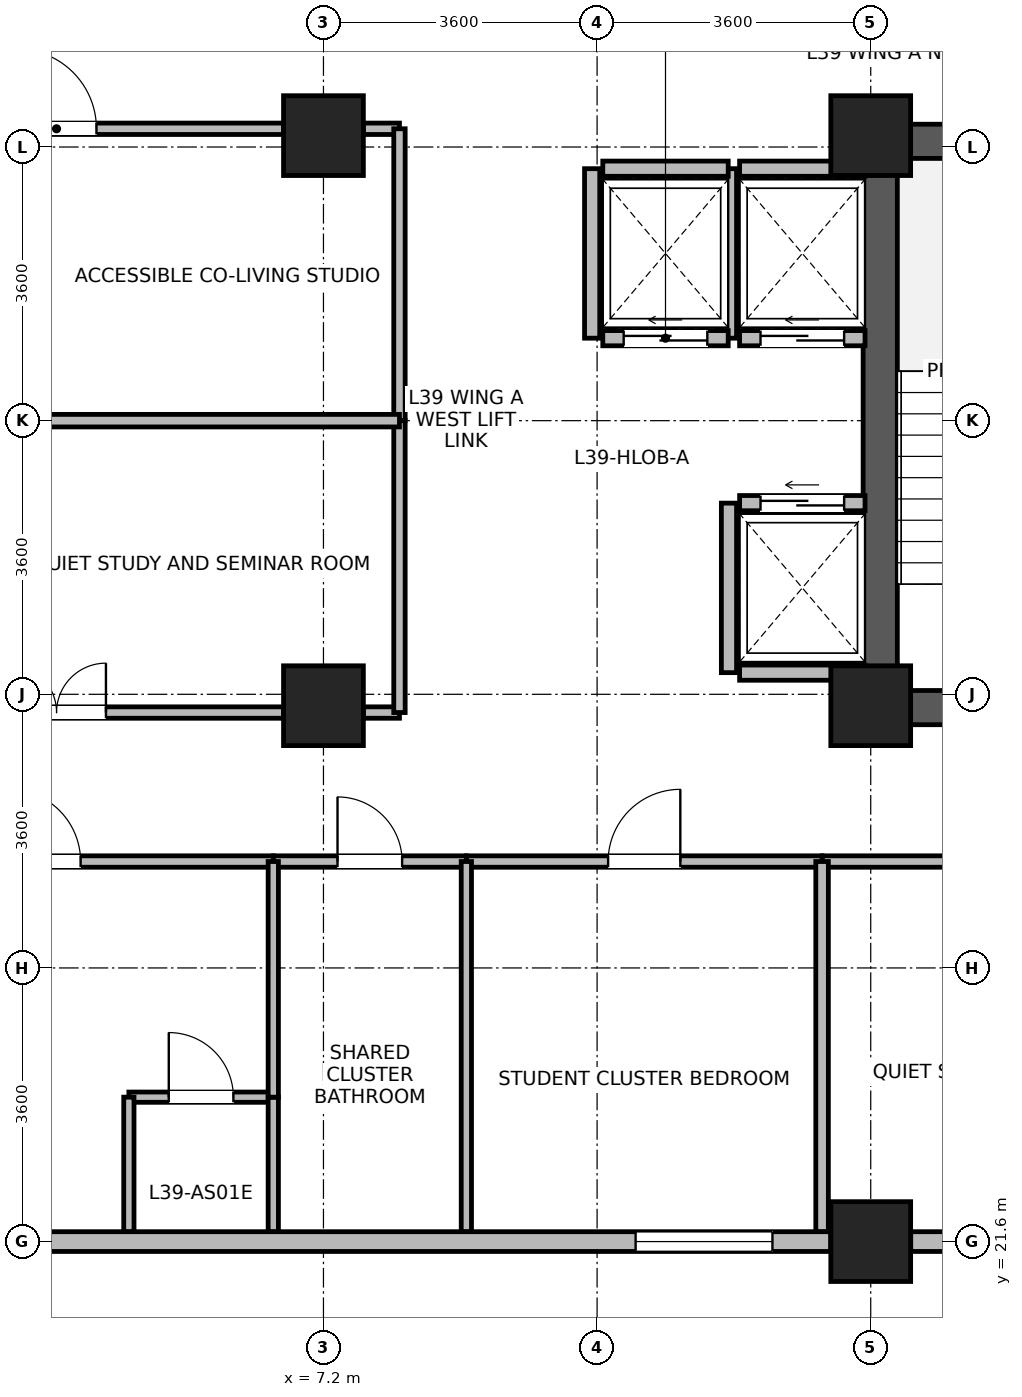
"""IFC4 building model, lengths in metres.
Left out: names, types, materials, properties, quantities, classifications, styles, units other than length and angle.
Written with IfcOpenShell. Run it as: python <this file> out.ifc"""

import sys

from ifc_helpers import new_model, si_unit, direction, frame, frame_2d, origin, origin_2d, place, context, subcontext, project, spatial, rectangle, extrude, source, transform, mapped, element, fill, save


model = new_model("IFC4")
c1 = context("Model", 3, precision=1e-05, world=origin(), true_north=direction((0.0, 1.0)))
c2 = subcontext(c1, "Body", "Model", "MODEL_VIEW")
j1 = project(units=[si_unit("LENGTHUNIT", "METRE"), si_unit("PLANEANGLEUNIT", "RADIAN")], contexts=[c1])
p1 = place(None, origin())
s1 = spatial("IfcSite", under=j1, at=p1, CompositionType="ELEMENT")
p2 = place(p1, origin())
s2 = spatial("IfcBuilding", under=s1, at=p2, CompositionType="ELEMENT")
p3 = place(p2, frame((0.0, 0.0, 155.0)))
s3 = spatial("IfcBuildingStorey", under=s2, at=p3, CompositionType="ELEMENT", Elevation=155.0)
p4 = place(p3, frame((14.525, 28.4, 0.0), z_axis=(0.0, 0.0, 1.0), x_axis=(0.0, 1.0, 0.0)))
e1 = element("IfcWall", 1, at=p4, inside=s3, PredefinedType="SHEAR", context=c2, shape_type="SweptSolid", body=[
    extrude(rectangle(XDim=7.9, YDim=0.45, at=frame_2d((3.95, 0.0))), origin(), (0.0, 0.0, 1.0), 3.46),
])
for number, where, z_axis, x_axis in (
    (2, (14.75, 28.625, 0.0), (0.0, 0.0, 1.0), (1.0, 0.0, 0.0)),
    (3, (14.75, 36.075, 0.0), (0.0, 0.0, 1.0), (1.0, 0.0, 0.0)),
):
    element("IfcWall", number, at=place(p3, frame(where, z_axis=z_axis, x_axis=x_axis)), inside=s3, PredefinedType="SHEAR", context=c2, shape_type="SweptSolid", body=[
        extrude(rectangle(XDim=3.2, YDim=0.45, at=frame_2d((1.6, 0.0))), origin(), (0.0, 0.0, 1.0), 3.46),
    ])
m1 = source(origin(), c2, "Body", "SweptSolid", [
    extrude(rectangle(XDim=1.05, YDim=1.05, at=origin_2d()), origin(), (0.0, 0.0, 1.0), 3.7),
])
for number, where, z_axis, x_axis in (
    (4, (7.2, 28.65, 0.0), (0.0, 0.0, 1.0), (1.0, 0.0, 0.0)),
    (5, (7.2, 36.15, 0.0), (0.0, 0.0, 1.0), (1.0, 0.0, 0.0)),
    (6, (14.4, 21.6, 0.0), (0.0, 0.0, 1.0), (1.0, 0.0, 0.0)),
    (7, (14.4, 28.65, 0.0), (0.0, 0.0, 1.0), (1.0, 0.0, 0.0)),
    (8, (14.4, 36.15, 0.0), (0.0, 0.0, 1.0), (1.0, 0.0, 0.0)),
):
    element("IfcColumn", number, at=place(p3, frame(where, z_axis=z_axis, x_axis=x_axis)), inside=s3, PredefinedType="COLUMN", context=c2, shape_type="MappedRepresentation", body=[
        mapped(m1, transform((0.0, 0.0, 0.0), x_axis=(1.0, 0.0, 0.0), y_axis=(0.0, 1.0, 0.0), z_axis=(0.0, 0.0, 1.0), scale=1.0)),
    ])
p5 = place(p3, frame((13.874, 21.6, 0.0), z_axis=(0.0, 0.0, 1.0), x_axis=(-1.0, 0.0, 0.0)))
e9 = element("IfcWall", 9, at=p5, inside=s3, PredefinedType="STANDARD", context=c2, shape_type="SweptSolid", body=[
    extrude(rectangle(XDim=13.337, YDim=0.26, at=frame_2d((6.668, 0.0))), origin(), (0.0, 0.0, 1.0), 3.44),
])
p6 = place(p5, frame((0.767, 0.0, 0.85)))
e10 = element("IfcOpeningElement", 10, at=p6, cuts=e9, PredefinedType="OPENING", context=c2, shape_type="SweptSolid", body=[
    extrude(rectangle(XDim=1.8, YDim=1.85, at=frame_2d((0.9, 0.925))), frame((0.0, 0.14, 0.0), z_axis=(0.0, -1.0, 0.0), x_axis=(1.0, 0.0, 0.0)), (0.0, 0.0, 1.0), 0.28),
])
p7 = place(p5, frame((10.77, 0.0, 0.85)))
e11 = element("IfcOpeningElement", 11, at=p7, cuts=e9, PredefinedType="OPENING", context=c2, shape_type="SweptSolid", body=[
    extrude(rectangle(XDim=1.8, YDim=1.85, at=frame_2d((0.9, 0.925))), frame((0.0, 0.14, 0.0), z_axis=(0.0, -1.0, 0.0), x_axis=(1.0, 0.0, 0.0)), (0.0, 0.0, 1.0), 0.28),
])
p8 = place(p3, frame((17.797, 21.6, 0.0), z_axis=(0.0, 0.0, 1.0), x_axis=(-1.0, 0.0, 0.0)))
e12 = element("IfcWall", 12, at=p8, inside=s3, PredefinedType="STANDARD", context=c2, shape_type="SweptSolid", body=[
    extrude(rectangle(XDim=2.871, YDim=0.26, at=frame_2d((1.436, 0.0))), origin(), (0.0, 0.0, 1.0), 2.99),
])
p9 = place(p8, frame((0.96, 0.0, 0.85)))
e13 = element("IfcOpeningElement", 13, at=p9, cuts=e12, PredefinedType="OPENING", context=c2, shape_type="SweptSolid", body=[
    extrude(rectangle(XDim=0.95, YDim=1.75, at=frame_2d((0.475, 0.875))), frame((0.0, 0.14, 0.0), z_axis=(0.0, -1.0, 0.0), x_axis=(1.0, 0.0, 0.0)), (0.0, 0.0, 1.0), 0.28),
])
p10 = place(p3, frame((12.675, 33.485, 0.0), z_axis=(0.0, 0.0, 1.0), x_axis=(1.0, 0.0, 0.0)))
e14 = element("IfcWall", 14, at=p10, inside=s3, PredefinedType="PARTITIONING", context=c2, shape_type="SweptSolid", body=[
    extrude(rectangle(XDim=1.65, YDim=0.2, at=frame_2d((0.825, 0.0))), origin(), (0.0, 0.0, 1.0), 3.44),
])
p11 = place(p10, frame((0.275, 0.0, 0.0)))
e15 = element("IfcOpeningElement", 15, at=p11, cuts=e14, PredefinedType="OPENING", context=c2, shape_type="SweptSolid", body=[
    extrude(rectangle(XDim=1.1, YDim=2.12, at=frame_2d((0.55, 1.06))), frame((0.0, 0.11, 0.0), z_axis=(0.0, -1.0, 0.0), x_axis=(1.0, 0.0, 0.0)), (0.0, 0.0, 1.0), 0.22),
])
p12 = place(p3, frame((12.675, 35.715, 0.0), z_axis=(0.0, 0.0, 1.0), x_axis=(1.0, 0.0, 0.0)))
e16 = element("IfcWall", 16, at=p12, inside=s3, PredefinedType="PARTITIONING", context=c2, shape_type="SweptSolid", body=[
    extrude(rectangle(XDim=1.65, YDim=0.2, at=frame_2d((0.825, 0.0))), origin(), (0.0, 0.0, 1.0), 3.44),
])
p13 = place(p3, frame((12.535, 33.485, 0.0), z_axis=(0.0, 0.0, 1.0), x_axis=(0.0, 1.0, 0.0)))
e17 = element("IfcWall", 17, at=p13, inside=s3, PredefinedType="PARTITIONING", context=c2, shape_type="SweptSolid", body=[
    extrude(rectangle(XDim=2.23, YDim=0.2, at=frame_2d((1.115, 0.0))), origin(), (0.0, 0.0, 1.0), 3.44),
])
p14 = place(p3, frame((12.675, 29.085, 0.0), z_axis=(0.0, 0.0, 1.0), x_axis=(1.0, 0.0, 0.0)))
e18 = element("IfcWall", 18, at=p14, inside=s3, PredefinedType="PARTITIONING", context=c2, shape_type="SweptSolid", body=[
    extrude(rectangle(XDim=1.65, YDim=0.2, at=frame_2d((0.825, 0.0))), origin(), (0.0, 0.0, 1.0), 3.44),
])
p15 = place(p3, frame((12.675, 31.315, 0.0), z_axis=(0.0, 0.0, 1.0), x_axis=(1.0, 0.0, 0.0)))
e19 = element("IfcWall", 19, at=p15, inside=s3, PredefinedType="PARTITIONING", context=c2, shape_type="SweptSolid", body=[
    extrude(rectangle(XDim=1.65, YDim=0.2, at=frame_2d((0.825, 0.0))), origin(), (0.0, 0.0, 1.0), 3.44),
])
p16 = place(p15, frame((0.275, 0.0, 0.0)))
e20 = element("IfcOpeningElement", 20, at=p16, cuts=e19, PredefinedType="OPENING", context=c2, shape_type="SweptSolid", body=[
    extrude(rectangle(XDim=1.1, YDim=2.12, at=frame_2d((0.55, 1.06))), frame((0.0, 0.11, 0.0), z_axis=(0.0, -1.0, 0.0), x_axis=(1.0, 0.0, 0.0)), (0.0, 0.0, 1.0), 0.22),
])
p17 = place(p3, frame((12.535, 29.085, 0.0), z_axis=(0.0, 0.0, 1.0), x_axis=(0.0, 1.0, 0.0)))
e21 = element("IfcWall", 21, at=p17, inside=s3, PredefinedType="PARTITIONING", context=c2, shape_type="SweptSolid", body=[
    extrude(rectangle(XDim=2.23, YDim=0.2, at=frame_2d((1.115, 0.0))), origin(), (0.0, 0.0, 1.0), 3.44),
])
p18 = place(p3, frame((10.875, 33.485, 0.0), z_axis=(0.0, 0.0, 1.0), x_axis=(1.0, 0.0, 0.0)))
e22 = element("IfcWall", 22, at=p18, inside=s3, PredefinedType="PARTITIONING", context=c2, shape_type="SweptSolid", body=[
    extrude(rectangle(XDim=1.65, YDim=0.2, at=frame_2d((0.825, 0.0))), origin(), (0.0, 0.0, 1.0), 3.44),
])
p19 = place(p18, frame((0.275, 0.0, 0.0)))
e23 = element("IfcOpeningElement", 23, at=p19, cuts=e22, PredefinedType="OPENING", context=c2, shape_type="SweptSolid", body=[
    extrude(rectangle(XDim=1.1, YDim=2.12, at=frame_2d((0.55, 1.06))), frame((0.0, 0.11, 0.0), z_axis=(0.0, -1.0, 0.0), x_axis=(1.0, 0.0, 0.0)), (0.0, 0.0, 1.0), 0.22),
])
p20 = place(p3, frame((10.875, 35.715, 0.0), z_axis=(0.0, 0.0, 1.0), x_axis=(1.0, 0.0, 0.0)))
e24 = element("IfcWall", 24, at=p20, inside=s3, PredefinedType="PARTITIONING", context=c2, shape_type="SweptSolid", body=[
    extrude(rectangle(XDim=1.65, YDim=0.2, at=frame_2d((0.825, 0.0))), origin(), (0.0, 0.0, 1.0), 3.44),
])
p21 = place(p3, frame((10.735, 33.485, 0.0), z_axis=(0.0, 0.0, 1.0), x_axis=(0.0, 1.0, 0.0)))
e25 = element("IfcWall", 25, at=p21, inside=s3, PredefinedType="PARTITIONING", context=c2, shape_type="SweptSolid", body=[
    extrude(rectangle(XDim=2.23, YDim=0.2, at=frame_2d((1.115, 0.0))), origin(), (0.0, 0.0, 1.0), 3.44),
])
p22 = place(p3, frame((4.64, 23.5, 0.0), z_axis=(0.0, 0.0, 1.0), x_axis=(1.0, 0.0, 0.0)))
e26 = element("IfcWall", 26, at=p22, inside=s3, PredefinedType="PARTITIONING", context=c2, shape_type="SweptSolid", body=[
    extrude(rectangle(XDim=1.9, YDim=0.135, at=frame_2d((0.95, 0.0))), origin(), (0.0, 0.0, 1.0), 3.44),
])
p23 = place(p22, frame((0.525, 0.0, 0.0)))
e27 = element("IfcOpeningElement", 27, at=p23, cuts=e26, PredefinedType="OPENING", context=c2, shape_type="SweptSolid", body=[
    extrude(rectangle(XDim=0.85, YDim=2.04, at=frame_2d((0.425, 1.02))), frame((0.0, 0.078, 0.0), z_axis=(0.0, -1.0, 0.0), x_axis=(1.0, 0.0, 0.0)), (0.0, 0.0, 1.0), 0.155),
])
for number, where, z_axis, x_axis in (
    (28, (4.64, 21.732, 0.0), (0.0, 0.0, 1.0), (0.0, 1.0, 0.0)),
    (29, (6.54, 21.732, 0.0), (0.0, 0.0, 1.0), (0.0, 1.0, 0.0)),
):
    element("IfcWall", number, at=place(p3, frame(where, z_axis=z_axis, x_axis=x_axis)), inside=s3, PredefinedType="PARTITIONING", context=c2, shape_type="SweptSolid", body=[
        extrude(rectangle(XDim=1.768, YDim=0.135, at=frame_2d((0.884, 0.0))), origin(), (0.0, 0.0, 1.0), 3.44),
    ])
p24 = place(p3, frame((0.702, 28.56, 0.0), z_axis=(0.0, 0.0, 1.0), x_axis=(1.0, 0.0, 0.0)))
e30 = element("IfcWall", 30, at=p24, inside=s3, PredefinedType="PARTITIONING", context=c2, shape_type="SweptSolid", body=[
    extrude(rectangle(XDim=5.973, YDim=0.15, at=frame_2d((2.987, 0.0))), origin(), (0.0, 0.0, 1.0), 2.84),
])
p25 = place(p24, frame((2.336, 0.0, 0.0)))
e31 = element("IfcOpeningElement", 31, at=p25, cuts=e30, PredefinedType="OPENING", context=c2, shape_type="SweptSolid", body=[
    extrude(rectangle(XDim=1.3, YDim=2.12, at=frame_2d((0.65, 1.06))), frame((0.0, 0.085, 0.0), z_axis=(0.0, -1.0, 0.0), x_axis=(1.0, 0.0, 0.0)), (0.0, 0.0, 1.0), 0.17),
])
p26 = place(p3, frame((7.725, 28.56, 0.0), z_axis=(0.0, 0.0, 1.0), x_axis=(1.0, 0.0, 0.0)))
e32 = element("IfcWall", 32, at=p26, inside=s3, PredefinedType="PARTITIONING", context=c2, shape_type="SweptSolid", body=[
    extrude(rectangle(XDim=0.475, YDim=0.15, at=frame_2d((0.237, 0.0))), origin(), (0.0, 0.0, 1.0), 2.84),
])
p27 = place(p3, frame((0.702, 36.24, 0.0), z_axis=(0.0, 0.0, 1.0), x_axis=(1.0, 0.0, 0.0)))
e33 = element("IfcWall", 33, at=p27, inside=s3, PredefinedType="PARTITIONING", context=c2, shape_type="SweptSolid", body=[
    extrude(rectangle(XDim=5.973, YDim=0.15, at=frame_2d((2.987, 0.0))), origin(), (0.0, 0.0, 1.0), 2.84),
])
p28 = place(p27, frame((2.461, 0.0, 0.0)))
e34 = element("IfcOpeningElement", 34, at=p28, cuts=e33, PredefinedType="OPENING", context=c2, shape_type="SweptSolid", body=[
    extrude(rectangle(XDim=1.05, YDim=2.12, at=frame_2d((0.525, 1.06))), frame((0.0, 0.085, 0.0), z_axis=(0.0, -1.0, 0.0), x_axis=(1.0, 0.0, 0.0)), (0.0, 0.0, 1.0), 0.17),
])
p29 = place(p3, frame((7.725, 36.24, 0.0), z_axis=(0.0, 0.0, 1.0), x_axis=(1.0, 0.0, 0.0)))
e35 = element("IfcWall", 35, at=p29, inside=s3, PredefinedType="PARTITIONING", context=c2, shape_type="SweptSolid", body=[
    extrude(rectangle(XDim=0.475, YDim=0.15, at=frame_2d((0.237, 0.0))), origin(), (0.0, 0.0, 1.0), 2.84),
])
p30 = place(p3, frame((0.52, 26.6, 0.0), z_axis=(0.0, 0.0, 1.0), x_axis=(1.0, 0.0, 0.0)))
e36 = element("IfcWall", 36, at=p30, inside=s3, PredefinedType="PARTITIONING", context=c2, shape_type="SweptSolid", body=[
    extrude(rectangle(XDim=6.02, YDim=0.15, at=frame_2d((3.01, 0.0))), origin(), (0.0, 0.0, 1.0), 3.44),
])
p31 = place(p30, frame((2.535, 0.0, 0.0)))
e37 = element("IfcOpeningElement", 37, at=p31, cuts=e36, PredefinedType="OPENING", context=c2, shape_type="SweptSolid", body=[
    extrude(rectangle(XDim=0.95, YDim=2.1, at=frame_2d((0.475, 1.05))), frame((0.0, 0.085, 0.0), z_axis=(0.0, -1.0, 0.0), x_axis=(1.0, 0.0, 0.0)), (0.0, 0.0, 1.0), 0.17),
])
p32 = place(p3, frame((13.76, 26.6, 0.0), z_axis=(0.0, 0.0, 1.0), x_axis=(1.0, 0.0, 0.0)))
e38 = element("IfcWall", 38, at=p32, inside=s3, PredefinedType="PARTITIONING", context=c2, shape_type="SweptSolid", body=[
    extrude(rectangle(XDim=5.78, YDim=0.15, at=frame_2d((2.89, 0.0))), origin(), (0.0, 0.0, 1.0), 3.44),
])
p33 = place(p32, frame((2.24, 0.0, 0.0)))
e39 = element("IfcOpeningElement", 39, at=p33, cuts=e38, PredefinedType="OPENING", context=c2, shape_type="SweptSolid", body=[
    extrude(rectangle(XDim=1.3, YDim=2.12, at=frame_2d((0.65, 1.06))), frame((0.0, 0.085, 0.0), z_axis=(0.0, -1.0, 0.0), x_axis=(1.0, 0.0, 0.0)), (0.0, 0.0, 1.0), 0.17),
])
p34 = place(p3, frame((9.08, 26.6, 0.0), z_axis=(0.0, 0.0, 1.0), x_axis=(1.0, 0.0, 0.0)))
e40 = element("IfcWall", 40, at=p34, inside=s3, PredefinedType="PARTITIONING", context=c2, shape_type="SweptSolid", body=[
    extrude(rectangle(XDim=4.68, YDim=0.15, at=frame_2d((2.34, 0.0))), origin(), (0.0, 0.0, 1.0), 3.44),
])
p35 = place(p34, frame((1.865, 0.0, 0.0)))
e41 = element("IfcOpeningElement", 41, at=p35, cuts=e40, PredefinedType="OPENING", context=c2, shape_type="SweptSolid", body=[
    extrude(rectangle(XDim=0.95, YDim=2.1, at=frame_2d((0.475, 1.05))), frame((0.0, 0.085, 0.0), z_axis=(0.0, -1.0, 0.0), x_axis=(1.0, 0.0, 0.0)), (0.0, 0.0, 1.0), 0.17),
])
p36 = place(p3, frame((8.2, 32.4, 0.0), z_axis=(0.0, 0.0, 1.0), x_axis=(0.0, 1.0, 0.0)))
e42 = element("IfcWall", 42, at=p36, inside=s3, PredefinedType="PARTITIONING", context=c2, shape_type="SweptSolid", body=[
    extrude(rectangle(XDim=3.84, YDim=0.15, at=frame_2d((1.92, 0.0))), origin(), (0.0, 0.0, 1.0), 3.44),
])
p37 = place(p3, frame((8.2, 28.56, 0.0), z_axis=(0.0, 0.0, 1.0), x_axis=(0.0, 1.0, 0.0)))
e43 = element("IfcWall", 43, at=p37, inside=s3, PredefinedType="PARTITIONING", context=c2, shape_type="SweptSolid", body=[
    extrude(rectangle(XDim=3.84, YDim=0.15, at=frame_2d((1.92, 0.0))), origin(), (0.0, 0.0, 1.0), 3.44),
])
p38 = place(p3, frame((6.54, 26.6, 0.0), z_axis=(0.0, 0.0, 1.0), x_axis=(1.0, 0.0, 0.0)))
e44 = element("IfcWall", 44, at=p38, inside=s3, PredefinedType="PARTITIONING", context=c2, shape_type="SweptSolid", body=[
    extrude(rectangle(XDim=2.54, YDim=0.15, at=frame_2d((1.27, 0.0))), origin(), (0.0, 0.0, 1.0), 3.44),
])
p39 = place(p38, frame((0.845, 0.0, 0.0)))
e45 = element("IfcOpeningElement", 45, at=p39, cuts=e44, PredefinedType="OPENING", context=c2, shape_type="SweptSolid", body=[
    extrude(rectangle(XDim=0.85, YDim=2.04, at=frame_2d((0.425, 1.02))), frame((0.0, 0.085, 0.0), z_axis=(0.0, -1.0, 0.0), x_axis=(1.0, 0.0, 0.0)), (0.0, 0.0, 1.0), 0.17),
])
p40 = place(p3, frame((0.52, 32.4, 0.0), z_axis=(0.0, 0.0, 1.0), x_axis=(1.0, 0.0, 0.0)))
e46 = element("IfcWall", 46, at=p40, inside=s3, PredefinedType="PARTITIONING", context=c2, shape_type="SweptSolid", body=[
    extrude(rectangle(XDim=7.68, YDim=0.165, at=frame_2d((3.84, 0.0))), origin(), (0.0, 0.0, 1.0), 3.44),
])
p41 = place(p3, frame((9.08, 21.732, 0.0), z_axis=(0.0, 0.0, 1.0), x_axis=(0.0, 1.0, 0.0)))
e47 = element("IfcWall", 47, at=p41, inside=s3, PredefinedType="PARTITIONING", context=c2, shape_type="SweptSolid", body=[
    extrude(rectangle(XDim=4.868, YDim=0.135, at=frame_2d((2.434, 0.0))), origin(), (0.0, 0.0, 1.0), 3.44),
])
p42 = place(p3, frame((13.76, 21.732, 0.0), z_axis=(0.0, 0.0, 1.0), x_axis=(0.0, 1.0, 0.0)))
e48 = element("IfcWall", 48, at=p42, inside=s3, PredefinedType="PARTITIONING", context=c2, shape_type="SweptSolid", body=[
    extrude(rectangle(XDim=4.868, YDim=0.165, at=frame_2d((2.434, 0.0))), origin(), (0.0, 0.0, 1.0), 3.44),
])
p43 = place(p3, frame((6.54, 23.5, 0.0), z_axis=(0.0, 0.0, 1.0), x_axis=(0.0, 1.0, 0.0)))
e49 = element("IfcWall", 49, at=p43, inside=s3, PredefinedType="PARTITIONING", context=c2, shape_type="SweptSolid", body=[
    extrude(rectangle(XDim=3.1, YDim=0.135, at=frame_2d((1.55, 0.0))), origin(), (0.0, 0.0, 1.0), 3.44),
])
p44 = place(p6, origin())
e50 = element("IfcWindow", 50, at=p44, inside=s3, PartitioningType="SINGLE_PANEL", PredefinedType="WINDOW", context=c2, shape_type="SweptSolid", body=[
    extrude(rectangle(XDim=1.8, YDim=1.85, at=frame_2d((0.9, 0.925))), frame((0.0, 0.03, 0.0), z_axis=(0.0, -1.0, 0.0), x_axis=(1.0, 0.0, 0.0)), (0.0, 0.0, 1.0), 0.06),
])
fill(e10, e50)
p45 = place(p11, origin())
e51 = element("IfcDoor", 51, at=p45, inside=s3, OperationType="SLIDING_TO_LEFT", PredefinedType="DOOR", context=c2, shape_type="SweptSolid", body=[
    extrude(rectangle(XDim=1.1, YDim=2.12, at=frame_2d((0.55, 1.06))), frame((0.0, 0.025, 0.0), z_axis=(0.0, -1.0, 0.0), x_axis=(1.0, 0.0, 0.0)), (0.0, 0.0, 1.0), 0.05),
])
fill(e15, e51)
p46 = place(p16, origin())
e52 = element("IfcDoor", 52, at=p46, inside=s3, OperationType="SLIDING_TO_LEFT", PredefinedType="DOOR", context=c2, shape_type="SweptSolid", body=[
    extrude(rectangle(XDim=1.1, YDim=2.12, at=frame_2d((0.55, 1.06))), frame((0.0, 0.025, 0.0), z_axis=(0.0, -1.0, 0.0), x_axis=(1.0, 0.0, 0.0)), (0.0, 0.0, 1.0), 0.05),
])
fill(e20, e52)
p47 = place(p19, origin())
e53 = element("IfcDoor", 53, at=p47, inside=s3, OperationType="SLIDING_TO_LEFT", PredefinedType="DOOR", context=c2, shape_type="SweptSolid", body=[
    extrude(rectangle(XDim=1.1, YDim=2.12, at=frame_2d((0.55, 1.06))), frame((0.0, 0.025, 0.0), z_axis=(0.0, -1.0, 0.0), x_axis=(1.0, 0.0, 0.0)), (0.0, 0.0, 1.0), 0.05),
])
fill(e23, e53)
p48 = place(p23, origin())
e54 = element("IfcDoor", 54, at=p48, inside=s3, OperationType="SINGLE_SWING_LEFT", PredefinedType="DOOR", context=c2, shape_type="SweptSolid", body=[
    extrude(rectangle(XDim=0.85, YDim=2.04, at=frame_2d((0.425, 1.02))), frame((0.0, 0.025, 0.0), z_axis=(0.0, -1.0, 0.0), x_axis=(1.0, 0.0, 0.0)), (0.0, 0.0, 1.0), 0.05),
])
fill(e27, e54)
p49 = place(p25, origin())
e55 = element("IfcDoor", 55, at=p49, inside=s3, OperationType="DOUBLE_DOOR_SINGLE_SWING", PredefinedType="DOOR", context=c2, shape_type="SweptSolid", body=[
    extrude(rectangle(XDim=1.3, YDim=2.12, at=frame_2d((0.65, 1.06))), frame((0.0, 0.025, 0.0), z_axis=(0.0, -1.0, 0.0), x_axis=(1.0, 0.0, 0.0)), (0.0, 0.0, 1.0), 0.05),
])
fill(e31, e55)
p50 = place(p28, origin())
e56 = element("IfcDoor", 56, at=p50, inside=s3, OperationType="SINGLE_SWING_LEFT", PredefinedType="DOOR", context=c2, shape_type="SweptSolid", body=[
    extrude(rectangle(XDim=1.05, YDim=2.12, at=frame_2d((0.525, 1.06))), frame((0.0, 0.025, 0.0), z_axis=(0.0, -1.0, 0.0), x_axis=(1.0, 0.0, 0.0)), (0.0, 0.0, 1.0), 0.05),
])
fill(e34, e56)
p51 = place(p31, origin())
e57 = element("IfcDoor", 57, at=p51, inside=s3, OperationType="SINGLE_SWING_LEFT", PredefinedType="DOOR", context=c2, shape_type="SweptSolid", body=[
    extrude(rectangle(XDim=0.95, YDim=2.1, at=frame_2d((0.475, 1.05))), frame((0.0, 0.025, 0.0), z_axis=(0.0, -1.0, 0.0), x_axis=(1.0, 0.0, 0.0)), (0.0, 0.0, 1.0), 0.05),
])
fill(e37, e57)
p52 = place(p35, origin())
e58 = element("IfcDoor", 58, at=p52, inside=s3, OperationType="SINGLE_SWING_RIGHT", PredefinedType="DOOR", context=c2, shape_type="SweptSolid", body=[
    extrude(rectangle(XDim=0.95, YDim=2.1, at=frame_2d((0.475, 1.05))), frame((0.0, 0.025, 0.0), z_axis=(0.0, -1.0, 0.0), x_axis=(1.0, 0.0, 0.0)), (0.0, 0.0, 1.0), 0.05),
])
fill(e41, e58)
p53 = place(p39, origin())
e59 = element("IfcDoor", 59, at=p53, inside=s3, OperationType="SINGLE_SWING_LEFT", PredefinedType="DOOR", context=c2, shape_type="SweptSolid", body=[
    extrude(rectangle(XDim=0.85, YDim=2.04, at=frame_2d((0.425, 1.02))), frame((0.0, 0.025, 0.0), z_axis=(0.0, -1.0, 0.0), x_axis=(1.0, 0.0, 0.0)), (0.0, 0.0, 1.0), 0.05),
])
fill(e45, e59)
save(model, sys.argv[1])
